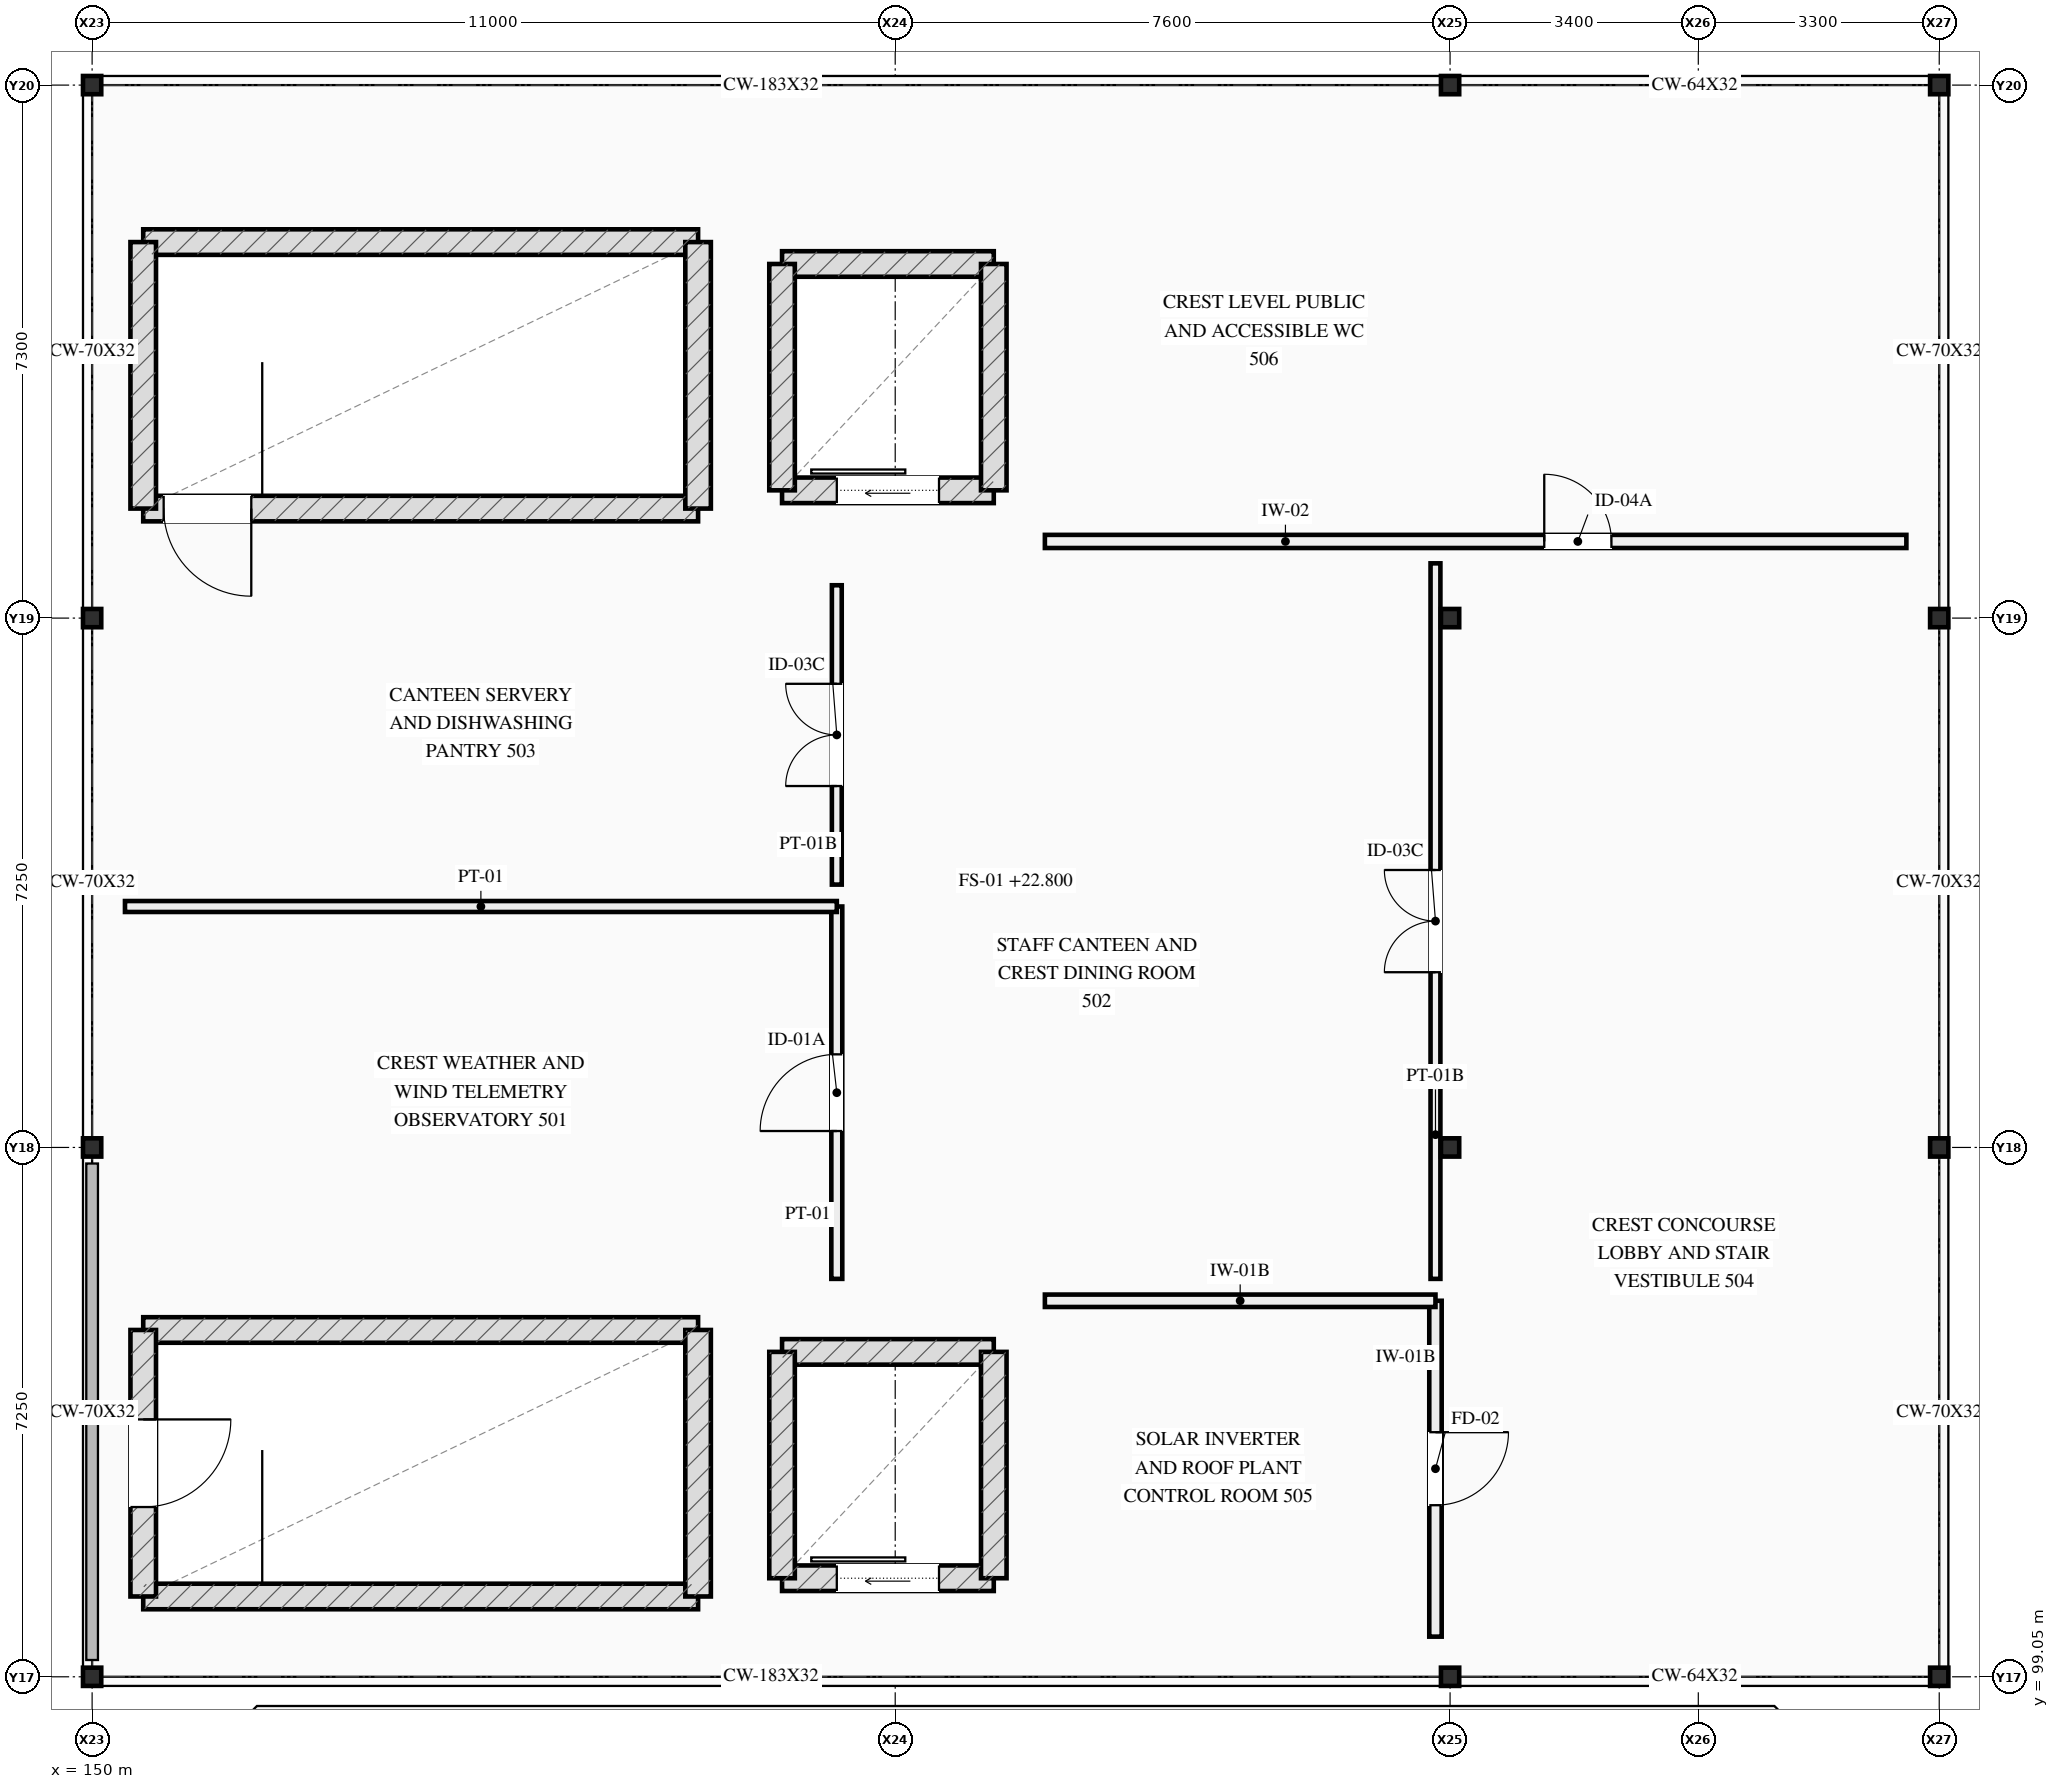
"""IFC4 building model, lengths in metres.
Left out: names, types, materials, properties, quantities, classifications, styles, units other than length and angle.
Written with IfcOpenShell. Run it as: python <this file> out.ifc"""

import sys

from ifc_helpers import new_model, si_unit, direction, frame, frame_2d, origin, origin_2d, place, context, subcontext, project, spatial, rectangle, hollow_rectangle, extrude, element, fill, save


model = new_model("IFC4")
c1 = context("Model", 3, precision=1e-05, world=origin(), true_north=direction((0.0, 1.0)))
c2 = subcontext(c1, "Body", "Model", "MODEL_VIEW")
j1 = project(units=[si_unit("LENGTHUNIT", "METRE"), si_unit("PLANEANGLEUNIT", "RADIAN")], contexts=[c1])
p1 = place(None, origin())
s1 = spatial("IfcSite", under=j1, at=p1, CompositionType="ELEMENT")
p2 = place(p1, origin())
s2 = spatial("IfcBuilding", under=s1, at=p2, CompositionType="ELEMENT")
p3 = place(p2, frame((0.0, 0.0, 22.8)))
s3 = spatial("IfcBuildingStorey", under=s2, at=p3, CompositionType="ELEMENT", Elevation=22.8)
for number, where, z_axis, x_axis in (
    (1, (150.0, 99.05, 0.0), (0.0, 0.0, 1.0), (1.0, 0.0, 0.0)),
    (2, (150.0, 106.3, 0.0), (0.0, 0.0, 1.0), (1.0, 0.0, 0.0)),
    (3, (150.0, 113.55, 0.0), (0.0, 0.0, 1.0), (1.0, 0.0, 0.0)),
    (4, (150.0, 120.85, 0.0), (0.0, 0.0, 1.0), (1.0, 0.0, 0.0)),
    (5, (168.6, 99.05, 0.0), (0.0, 0.0, 1.0), (1.0, 0.0, 0.0)),
    (6, (168.6, 106.3, 0.0), (0.0, 0.0, 1.0), (1.0, 0.0, 0.0)),
    (7, (168.6, 113.55, 0.0), (0.0, 0.0, 1.0), (1.0, 0.0, 0.0)),
    (8, (168.6, 120.85, 0.0), (0.0, 0.0, 1.0), (1.0, 0.0, 0.0)),
    (9, (175.3, 99.05, 0.0), (0.0, 0.0, 1.0), (1.0, 0.0, 0.0)),
    (10, (175.3, 106.3, 0.0), (0.0, 0.0, 1.0), (1.0, 0.0, 0.0)),
    (11, (175.3, 113.55, 0.0), (0.0, 0.0, 1.0), (1.0, 0.0, 0.0)),
    (12, (175.3, 120.85, 0.0), (0.0, 0.0, 1.0), (1.0, 0.0, 0.0)),
):
    element("IfcColumn", number, at=place(p3, frame(where, z_axis=z_axis, x_axis=x_axis)), inside=s3, PredefinedType="COLUMN", context=c2, shape_type="SweptSolid", body=[
        extrude(hollow_rectangle(XDim=0.25, YDim=0.25, WallThickness=0.01, at=origin_2d()), origin(), (0.0, 0.0, 1.0), 4.2),
    ])
for number, where, z_axis, x_axis in (
    (13, (150.7, 100.15, 0.0), (0.0, 0.0, 1.0), (1.0, 0.0, 0.0)),
    (14, (158.3, 103.8, 0.0), (0.0, 0.0, 1.0), (-1.0, 0.0, 0.0)),
):
    element("IfcWall", number, at=place(p3, frame(where, z_axis=z_axis, x_axis=x_axis)), inside=s3, PredefinedType="SHEAR", context=c2, shape_type="SweptSolid", body=[
        extrude(rectangle(XDim=7.6, YDim=0.35, at=frame_2d((3.8, 0.0))), origin(), (0.0, 0.0, 1.0), 4.02),
    ])
p4 = place(p3, frame((150.7, 103.8, 0.0), z_axis=(0.0, 0.0, 1.0), x_axis=(0.0, -1.0, 0.0)))
e15 = element("IfcWall", 15, at=p4, inside=s3, PredefinedType="SHEAR", context=c2, shape_type="SweptSolid", body=[
    extrude(rectangle(XDim=3.65, YDim=0.35, at=frame_2d((1.825, 0.0))), origin(), (0.0, 0.0, 1.0), 4.02),
])
p5 = place(p4, frame((1.225, 0.0, 0.0)))
e16 = element("IfcOpeningElement", 16, at=p5, cuts=e15, PredefinedType="OPENING", context=c2, shape_type="SweptSolid", body=[
    extrude(rectangle(XDim=1.2, YDim=2.2, at=frame_2d((0.6, 1.1))), frame((0.0, 0.185, 0.0), z_axis=(0.0, -1.0, 0.0), x_axis=(1.0, 0.0, 0.0)), (0.0, 0.0, 1.0), 0.37),
])
p6 = place(p3, frame((158.3, 100.15, 0.0), z_axis=(0.0, 0.0, 1.0), x_axis=(0.0, 1.0, 0.0)))
e17 = element("IfcWall", 17, at=p6, inside=s3, PredefinedType="SHEAR", context=c2, shape_type="SweptSolid", body=[
    extrude(rectangle(XDim=3.65, YDim=0.35, at=frame_2d((1.825, 0.0))), origin(), (0.0, 0.0, 1.0), 4.02),
])
p7 = place(p3, frame((159.45, 100.4, 0.0), z_axis=(0.0, 0.0, 1.0), x_axis=(1.0, 0.0, 0.0)))
e18 = element("IfcWall", 18, at=p7, inside=s3, PredefinedType="SHEAR", context=c2, shape_type="SweptSolid", body=[
    extrude(rectangle(XDim=2.9, YDim=0.35, at=frame_2d((1.45, 0.0))), origin(), (0.0, 0.0, 1.0), 4.005),
])
p8 = place(p7, frame((0.75, 0.0, 0.0)))
e19 = element("IfcOpeningElement", 19, at=p8, cuts=e18, PredefinedType="OPENING", context=c2, shape_type="SweptSolid", body=[
    extrude(rectangle(XDim=1.4, YDim=2.2, at=frame_2d((0.7, 1.1))), frame((0.0, 0.185, 0.0), z_axis=(0.0, -1.0, 0.0), x_axis=(1.0, 0.0, 0.0)), (0.0, 0.0, 1.0), 0.37),
])
p9 = place(p3, frame((159.45, 103.5, 0.0), z_axis=(0.0, 0.0, 1.0), x_axis=(1.0, 0.0, 0.0)))
e20 = element("IfcWall", 20, at=p9, inside=s3, PredefinedType="SHEAR", context=c2, shape_type="SweptSolid", body=[
    extrude(rectangle(XDim=2.9, YDim=0.35, at=frame_2d((1.45, 0.0))), origin(), (0.0, 0.0, 1.0), 4.005),
])
for number, where, z_axis, x_axis in (
    (21, (159.45, 100.4, 0.0), (0.0, 0.0, 1.0), (0.0, 1.0, 0.0)),
    (22, (162.35, 100.4, 0.0), (0.0, 0.0, 1.0), (0.0, 1.0, 0.0)),
):
    element("IfcWall", number, at=place(p3, frame(where, z_axis=z_axis, x_axis=x_axis)), inside=s3, PredefinedType="SHEAR", context=c2, shape_type="SweptSolid", body=[
        extrude(rectangle(XDim=3.1, YDim=0.35, at=frame_2d((1.55, 0.0))), origin(), (0.0, 0.0, 1.0), 4.005),
    ])
p10 = place(p3, frame((150.7, 115.05, 0.0), z_axis=(0.0, 0.0, 1.0), x_axis=(1.0, 0.0, 0.0)))
e23 = element("IfcWall", 23, at=p10, inside=s3, PredefinedType="SHEAR", context=c2, shape_type="SweptSolid", body=[
    extrude(rectangle(XDim=7.6, YDim=0.35, at=frame_2d((3.8, 0.0))), origin(), (0.0, 0.0, 1.0), 4.02),
])
p11 = place(p10, frame((0.28, 0.0, 0.0)))
e24 = element("IfcOpeningElement", 24, at=p11, cuts=e23, PredefinedType="OPENING", context=c2, shape_type="SweptSolid", body=[
    extrude(rectangle(XDim=1.2, YDim=2.2, at=frame_2d((0.6, 1.1))), frame((0.0, 0.185, 0.0), z_axis=(0.0, -1.0, 0.0), x_axis=(1.0, 0.0, 0.0)), (0.0, 0.0, 1.0), 0.37),
])
p12 = place(p3, frame((158.3, 118.7, 0.0), z_axis=(0.0, 0.0, 1.0), x_axis=(-1.0, 0.0, 0.0)))
e25 = element("IfcWall", 25, at=p12, inside=s3, PredefinedType="SHEAR", context=c2, shape_type="SweptSolid", body=[
    extrude(rectangle(XDim=7.6, YDim=0.35, at=frame_2d((3.8, 0.0))), origin(), (0.0, 0.0, 1.0), 4.02),
])
for number, where, z_axis, x_axis in (
    (26, (150.7, 118.7, 0.0), (0.0, 0.0, 1.0), (0.0, -1.0, 0.0)),
    (27, (158.3, 115.05, 0.0), (0.0, 0.0, 1.0), (0.0, 1.0, 0.0)),
):
    element("IfcWall", number, at=place(p3, frame(where, z_axis=z_axis, x_axis=x_axis)), inside=s3, PredefinedType="SHEAR", context=c2, shape_type="SweptSolid", body=[
        extrude(rectangle(XDim=3.65, YDim=0.35, at=frame_2d((1.825, 0.0))), origin(), (0.0, 0.0, 1.0), 4.02),
    ])
p13 = place(p3, frame((159.45, 115.3, 0.0), z_axis=(0.0, 0.0, 1.0), x_axis=(1.0, 0.0, 0.0)))
e28 = element("IfcWall", 28, at=p13, inside=s3, PredefinedType="SHEAR", context=c2, shape_type="SweptSolid", body=[
    extrude(rectangle(XDim=2.9, YDim=0.35, at=frame_2d((1.45, 0.0))), origin(), (0.0, 0.0, 1.0), 4.005),
])
p14 = place(p13, frame((0.75, 0.0, 0.0)))
e29 = element("IfcOpeningElement", 29, at=p14, cuts=e28, PredefinedType="OPENING", context=c2, shape_type="SweptSolid", body=[
    extrude(rectangle(XDim=1.4, YDim=2.2, at=frame_2d((0.7, 1.1))), frame((0.0, 0.185, 0.0), z_axis=(0.0, -1.0, 0.0), x_axis=(1.0, 0.0, 0.0)), (0.0, 0.0, 1.0), 0.37),
])
p15 = place(p3, frame((159.45, 118.4, 0.0), z_axis=(0.0, 0.0, 1.0), x_axis=(1.0, 0.0, 0.0)))
e30 = element("IfcWall", 30, at=p15, inside=s3, PredefinedType="SHEAR", context=c2, shape_type="SweptSolid", body=[
    extrude(rectangle(XDim=2.9, YDim=0.35, at=frame_2d((1.45, 0.0))), origin(), (0.0, 0.0, 1.0), 4.005),
])
for number, where, z_axis, x_axis in (
    (31, (159.45, 115.3, 0.0), (0.0, 0.0, 1.0), (0.0, 1.0, 0.0)),
    (32, (162.35, 115.3, 0.0), (0.0, 0.0, 1.0), (0.0, 1.0, 0.0)),
):
    element("IfcWall", number, at=place(p3, frame(where, z_axis=z_axis, x_axis=x_axis)), inside=s3, PredefinedType="SHEAR", context=c2, shape_type="SweptSolid", body=[
        extrude(rectangle(XDim=3.1, YDim=0.35, at=frame_2d((1.55, 0.0))), origin(), (0.0, 0.0, 1.0), 4.005),
    ])
p16 = place(p3, frame((160.2, 104.5, 0.0), z_axis=(0.0, 0.0, 1.0), x_axis=(0.0, 1.0, 0.0)))
e33 = element("IfcWall", 33, at=p16, inside=s3, PredefinedType="PARTITIONING", context=c2, shape_type="SweptSolid", body=[
    extrude(rectangle(XDim=5.1, YDim=0.15, at=frame_2d((2.55, 0.0))), origin(), (0.0, 0.0, 1.0), 3.05),
])
p17 = place(p16, frame((2.025, 0.0, 0.0)))
e34 = element("IfcOpeningElement", 34, at=p17, cuts=e33, PredefinedType="OPENING", context=c2, shape_type="SweptSolid", body=[
    extrude(rectangle(XDim=1.05, YDim=2.2, at=frame_2d((0.525, 1.1))), frame((0.0, 0.085, 0.0), z_axis=(0.0, -1.0, 0.0), x_axis=(1.0, 0.0, 0.0)), (0.0, 0.0, 1.0), 0.17),
])
p18 = place(p3, frame((150.45, 109.6, 0.0), z_axis=(0.0, 0.0, 1.0), x_axis=(1.0, 0.0, 0.0)))
e35 = element("IfcWall", 35, at=p18, inside=s3, PredefinedType="PARTITIONING", context=c2, shape_type="SweptSolid", body=[
    extrude(rectangle(XDim=9.75, YDim=0.15, at=frame_2d((4.875, 0.0))), origin(), (0.0, 0.0, 1.0), 3.05),
])
p19 = place(p3, frame((168.4, 104.5, 0.0), z_axis=(0.0, 0.0, 1.0), x_axis=(0.0, 1.0, 0.0)))
e36 = element("IfcWall", 36, at=p19, inside=s3, PredefinedType="PARTITIONING", context=c2, shape_type="SweptSolid", body=[
    extrude(rectangle(XDim=9.8, YDim=0.135, at=frame_2d((4.9, 0.0))), origin(), (0.0, 0.0, 1.0), 3.05),
])
p20 = place(p19, frame((4.2, 0.0, 0.0)))
e37 = element("IfcOpeningElement", 37, at=p20, cuts=e36, PredefinedType="OPENING", context=c2, shape_type="SweptSolid", body=[
    extrude(rectangle(XDim=1.4, YDim=2.15, at=frame_2d((0.7, 1.075))), frame((0.0, 0.077, 0.0), z_axis=(0.0, -1.0, 0.0), x_axis=(1.0, 0.0, 0.0)), (0.0, 0.0, 1.0), 0.155),
])
p21 = place(p3, frame((160.2, 109.9, 0.0), z_axis=(0.0, 0.0, 1.0), x_axis=(0.0, 1.0, 0.0)))
e38 = element("IfcWall", 38, at=p21, inside=s3, PredefinedType="PARTITIONING", context=c2, shape_type="SweptSolid", body=[
    extrude(rectangle(XDim=4.1, YDim=0.135, at=frame_2d((2.05, 0.0))), origin(), (0.0, 0.0, 1.0), 3.05),
])
p22 = place(p21, frame((1.35, 0.0, 0.0)))
e39 = element("IfcOpeningElement", 39, at=p22, cuts=e38, PredefinedType="OPENING", context=c2, shape_type="SweptSolid", body=[
    extrude(rectangle(XDim=1.4, YDim=2.15, at=frame_2d((0.7, 1.075))), frame((0.0, 0.077, 0.0), z_axis=(0.0, -1.0, 0.0), x_axis=(1.0, 0.0, 0.0)), (0.0, 0.0, 1.0), 0.155),
])
p23 = place(p3, frame((168.4, 99.6, 0.0), z_axis=(0.0, 0.0, 1.0), x_axis=(0.0, 1.0, 0.0)))
e40 = element("IfcWall", 40, at=p23, inside=s3, PredefinedType="SOLIDWALL", context=c2, shape_type="SweptSolid", body=[
    extrude(rectangle(XDim=4.6, YDim=0.17, at=frame_2d((2.3, 0.0))), origin(), (0.0, 0.0, 1.0), 3.05),
])
p24 = place(p23, frame((1.8, 0.0, 0.0)))
e41 = element("IfcOpeningElement", 41, at=p24, cuts=e40, PredefinedType="OPENING", context=c2, shape_type="SweptSolid", body=[
    extrude(rectangle(XDim=1.0, YDim=2.15, at=frame_2d((0.5, 1.075))), frame((0.0, 0.095, 0.0), z_axis=(0.0, -1.0, 0.0), x_axis=(1.0, 0.0, 0.0)), (0.0, 0.0, 1.0), 0.19),
])
p25 = place(p3, frame((163.05, 104.2, 0.0), z_axis=(0.0, 0.0, 1.0), x_axis=(1.0, 0.0, 0.0)))
e42 = element("IfcWall", 42, at=p25, inside=s3, PredefinedType="SOLIDWALL", context=c2, shape_type="SweptSolid", body=[
    extrude(rectangle(XDim=5.35, YDim=0.17, at=frame_2d((2.675, 0.0))), origin(), (0.0, 0.0, 1.0), 3.05),
])
p26 = place(p3, frame((163.05, 114.6, 0.0), z_axis=(0.0, 0.0, 1.0), x_axis=(1.0, 0.0, 0.0)))
e43 = element("IfcWall", 43, at=p26, inside=s3, PredefinedType="PLUMBINGWALL", context=c2, shape_type="SweptSolid", body=[
    extrude(rectangle(XDim=11.8, YDim=0.18, at=frame_2d((5.9, 0.0))), origin(), (0.0, 0.0, 1.0), 3.05),
])
p27 = place(p26, frame((6.84, 0.0, 0.0)))
e44 = element("IfcOpeningElement", 44, at=p27, cuts=e43, PredefinedType="OPENING", context=c2, shape_type="SweptSolid", body=[
    extrude(rectangle(XDim=0.92, YDim=2.1, at=frame_2d((0.46, 1.05))), frame((0.0, 0.1, 0.0), z_axis=(0.0, -1.0, 0.0), x_axis=(1.0, 0.0, 0.0)), (0.0, 0.0, 1.0), 0.2),
])
p28 = place(p5, origin())
e45 = element("IfcDoor", 45, at=p28, inside=s3, OperationType="SINGLE_SWING_LEFT", PredefinedType="DOOR", context=c2, shape_type="SweptSolid", body=[
    extrude(rectangle(XDim=1.2, YDim=2.2, at=frame_2d((0.6, 1.1))), frame((0.0, 0.025, 0.0), z_axis=(0.0, -1.0, 0.0), x_axis=(1.0, 0.0, 0.0)), (0.0, 0.0, 1.0), 0.05),
])
fill(e16, e45)
p29 = place(p8, origin())
e46 = element("IfcDoor", 46, at=p29, inside=s3, OperationType="SLIDING_TO_LEFT", PredefinedType="DOOR", context=c2, shape_type="SweptSolid", body=[
    extrude(rectangle(XDim=1.4, YDim=2.2, at=frame_2d((0.7, 1.1))), frame((0.0, 0.025, 0.0), z_axis=(0.0, -1.0, 0.0), x_axis=(1.0, 0.0, 0.0)), (0.0, 0.0, 1.0), 0.05),
])
fill(e19, e46)
p30 = place(p11, origin())
e47 = element("IfcDoor", 47, at=p30, inside=s3, OperationType="SINGLE_SWING_RIGHT", PredefinedType="DOOR", context=c2, shape_type="SweptSolid", body=[
    extrude(rectangle(XDim=1.2, YDim=2.2, at=frame_2d((0.6, 1.1))), frame((0.0, 0.025, 0.0), z_axis=(0.0, -1.0, 0.0), x_axis=(1.0, 0.0, 0.0)), (0.0, 0.0, 1.0), 0.05),
])
fill(e24, e47)
p31 = place(p14, origin())
e48 = element("IfcDoor", 48, at=p31, inside=s3, OperationType="SLIDING_TO_LEFT", PredefinedType="DOOR", context=c2, shape_type="SweptSolid", body=[
    extrude(rectangle(XDim=1.4, YDim=2.2, at=frame_2d((0.7, 1.1))), frame((0.0, 0.025, 0.0), z_axis=(0.0, -1.0, 0.0), x_axis=(1.0, 0.0, 0.0)), (0.0, 0.0, 1.0), 0.05),
])
fill(e29, e48)
p32 = place(p17, origin())
e49 = element("IfcDoor", 49, at=p32, inside=s3, OperationType="SINGLE_SWING_LEFT", PredefinedType="DOOR", context=c2, shape_type="SweptSolid", body=[
    extrude(rectangle(XDim=1.05, YDim=2.2, at=frame_2d((0.525, 1.1))), frame((0.0, 0.025, 0.0), z_axis=(0.0, -1.0, 0.0), x_axis=(1.0, 0.0, 0.0)), (0.0, 0.0, 1.0), 0.05),
])
fill(e34, e49)
p33 = place(p20, origin())
e50 = element("IfcDoor", 50, at=p33, inside=s3, OperationType="DOUBLE_DOOR_SINGLE_SWING", PredefinedType="DOOR", context=c2, shape_type="SweptSolid", body=[
    extrude(rectangle(XDim=1.4, YDim=2.15, at=frame_2d((0.7, 1.075))), frame((0.0, 0.025, 0.0), z_axis=(0.0, -1.0, 0.0), x_axis=(1.0, 0.0, 0.0)), (0.0, 0.0, 1.0), 0.05),
])
fill(e37, e50)
p34 = place(p22, origin())
e51 = element("IfcDoor", 51, at=p34, inside=s3, OperationType="DOUBLE_DOOR_SINGLE_SWING", PredefinedType="DOOR", context=c2, shape_type="SweptSolid", body=[
    extrude(rectangle(XDim=1.4, YDim=2.15, at=frame_2d((0.7, 1.075))), frame((0.0, 0.025, 0.0), z_axis=(0.0, -1.0, 0.0), x_axis=(1.0, 0.0, 0.0)), (0.0, 0.0, 1.0), 0.05),
])
fill(e39, e51)
p35 = place(p24, origin())
e52 = element("IfcDoor", 52, at=p35, inside=s3, OperationType="SINGLE_SWING_RIGHT", PredefinedType="DOOR", context=c2, shape_type="SweptSolid", body=[
    extrude(rectangle(XDim=1.0, YDim=2.15, at=frame_2d((0.5, 1.075))), frame((0.0, 0.025, 0.0), z_axis=(0.0, -1.0, 0.0), x_axis=(1.0, 0.0, 0.0)), (0.0, 0.0, 1.0), 0.05),
])
fill(e41, e52)
p36 = place(p27, origin())
e53 = element("IfcDoor", 53, at=p36, inside=s3, OperationType="SINGLE_SWING_LEFT", PredefinedType="DOOR", context=c2, shape_type="SweptSolid", body=[
    extrude(rectangle(XDim=0.92, YDim=2.1, at=frame_2d((0.46, 1.05))), frame((0.0, 0.025, 0.0), z_axis=(0.0, -1.0, 0.0), x_axis=(1.0, 0.0, 0.0)), (0.0, 0.0, 1.0), 0.05),
])
fill(e44, e53)
save(model, sys.argv[1])
